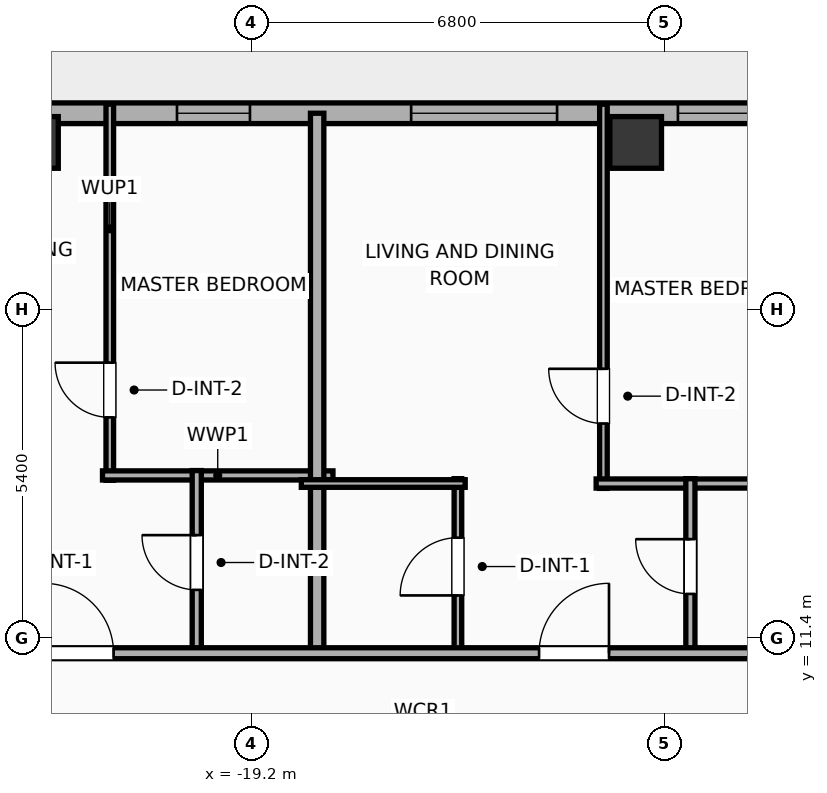
"""IFC4 building model, lengths in metres.
Left out: names, types, materials, properties, quantities, classifications, styles, units other than length and angle.
Written with IfcOpenShell. Run it as: python <this file> out.ifc"""

import sys

from ifc_helpers import new_model, si_unit, direction, frame, frame_2d, origin, origin_2d, place, context, subcontext, project, spatial, rectangle, hollow_rectangle, extrude, element, fill, save


model = new_model("IFC4")
c1 = context("Model", 3, precision=1e-05, world=origin(), true_north=direction((0.0, 1.0)))
c2 = subcontext(c1, "Body", "Model", "MODEL_VIEW")
j1 = project(units=[si_unit("LENGTHUNIT", "METRE"), si_unit("PLANEANGLEUNIT", "RADIAN")], contexts=[c1])
p1 = place(None, origin())
s1 = spatial("IfcSite", under=j1, at=p1, CompositionType="ELEMENT")
p2 = place(p1, origin())
s2 = spatial("IfcBuilding", under=s1, at=p2, CompositionType="ELEMENT")
p3 = place(p2, frame((0.0, 0.0, 231.4)))
s3 = spatial("IfcBuildingStorey", under=s2, at=p3, CompositionType="ELEMENT", Elevation=231.4)
for number, where, z_axis, x_axis in (
    (1, (-12.88, 19.55, 0.0), (0.0, 0.0, 1.0), (1.0, 0.0, 0.0)),
    (2, (-22.8, 19.55, 0.0), (0.0, 0.0, 1.0), (1.0, 0.0, 0.0)),
):
    element("IfcColumn", number, at=place(p3, frame(where, z_axis=z_axis, x_axis=x_axis)), inside=s3, PredefinedType="COLUMN", context=c2, shape_type="SweptSolid", body=[
        extrude(hollow_rectangle(XDim=0.85, YDim=0.85, WallThickness=0.028, at=origin_2d()), origin(), (0.0, 0.0, 1.0), 3.9),
    ])
p4 = place(p3, frame((-22.783, 20.03, 0.0), z_axis=(0.0, 0.0, 1.0), x_axis=(1.0, 0.0, 0.0)))
e3 = element("IfcWall", 3, at=p4, inside=s3, PredefinedType="ELEMENTEDWALL", context=c2, shape_type="SweptSolid", body=[
    extrude(rectangle(XDim=49.566, YDim=0.34, at=frame_2d((24.783, 0.0))), origin(), (0.0, 0.0, 1.0), 3.65),
])
p5 = place(p4, frame((14.12, 0.0, 0.0)))
e4 = element("IfcOpeningElement", 4, at=p5, cuts=e3, PredefinedType="OPENING", context=c2, shape_type="SweptSolid", body=[
    extrude(rectangle(XDim=1.5, YDim=2.05, at=frame_2d((0.75, 1.025))), frame((0.0, 0.18, 0.0), z_axis=(0.0, -1.0, 0.0), x_axis=(1.0, 0.0, 0.0)), (0.0, 0.0, 1.0), 0.36),
])
p6 = place(p4, frame((6.211, 0.0, 0.75)))
e5 = element("IfcOpeningElement", 5, at=p6, cuts=e3, PredefinedType="OPENING", context=c2, shape_type="SweptSolid", body=[
    extrude(rectangle(XDim=2.4, YDim=2.1, at=frame_2d((1.2, 1.05))), frame((0.0, 0.18, 0.0), z_axis=(0.0, -1.0, 0.0), x_axis=(1.0, 0.0, 0.0)), (0.0, 0.0, 1.0), 0.36),
])
p7 = place(p4, frame((23.583, 0.0, 0.75)))
e6 = element("IfcOpeningElement", 6, at=p7, cuts=e3, PredefinedType="OPENING", context=c2, shape_type="SweptSolid", body=[
    extrude(rectangle(XDim=2.4, YDim=2.1, at=frame_2d((1.2, 1.05))), frame((0.0, 0.18, 0.0), z_axis=(0.0, -1.0, 0.0), x_axis=(1.0, 0.0, 0.0)), (0.0, 0.0, 1.0), 0.36),
])
p8 = place(p4, frame((33.947, 0.0, 0.0)))
e7 = element("IfcOpeningElement", 7, at=p8, cuts=e3, PredefinedType="OPENING", context=c2, shape_type="SweptSolid", body=[
    extrude(rectangle(XDim=1.5, YDim=2.05, at=frame_2d((0.75, 1.025))), frame((0.0, 0.18, 0.0), z_axis=(0.0, -1.0, 0.0), x_axis=(1.0, 0.0, 0.0)), (0.0, 0.0, 1.0), 0.36),
])
p9 = place(p4, frame((2.36, 0.0, 0.75)))
e8 = element("IfcOpeningElement", 8, at=p9, cuts=e3, PredefinedType="OPENING", context=c2, shape_type="SweptSolid", body=[
    extrude(rectangle(XDim=1.2, YDim=2.05, at=frame_2d((0.6, 1.025))), frame((0.0, 0.18, 0.0), z_axis=(0.0, -1.0, 0.0), x_axis=(1.0, 0.0, 0.0)), (0.0, 0.0, 1.0), 0.36),
])
p10 = place(p4, frame((10.598, 0.0, 0.75)))
e9 = element("IfcOpeningElement", 9, at=p10, cuts=e3, PredefinedType="OPENING", context=c2, shape_type="SweptSolid", body=[
    extrude(rectangle(XDim=1.2, YDim=2.05, at=frame_2d((0.6, 1.025))), frame((0.0, 0.18, 0.0), z_axis=(0.0, -1.0, 0.0), x_axis=(1.0, 0.0, 0.0)), (0.0, 0.0, 1.0), 0.36),
])
p11 = place(p4, frame((17.478, 0.0, 0.75)))
e10 = element("IfcOpeningElement", 10, at=p11, cuts=e3, PredefinedType="OPENING", context=c2, shape_type="SweptSolid", body=[
    extrude(rectangle(XDim=1.2, YDim=2.05, at=frame_2d((0.6, 1.025))), frame((0.0, 0.18, 0.0), z_axis=(0.0, -1.0, 0.0), x_axis=(1.0, 0.0, 0.0)), (0.0, 0.0, 1.0), 0.36),
])
p12 = place(p4, frame((20.978, 0.0, 0.75)))
e11 = element("IfcOpeningElement", 11, at=p12, cuts=e3, PredefinedType="OPENING", context=c2, shape_type="SweptSolid", body=[
    extrude(rectangle(XDim=1.2, YDim=2.05, at=frame_2d((0.6, 1.025))), frame((0.0, 0.18, 0.0), z_axis=(0.0, -1.0, 0.0), x_axis=(1.0, 0.0, 0.0)), (0.0, 0.0, 1.0), 0.36),
])
p13 = place(p4, frame((27.758, 0.0, 0.75)))
e12 = element("IfcOpeningElement", 12, at=p13, cuts=e3, PredefinedType="OPENING", context=c2, shape_type="SweptSolid", body=[
    extrude(rectangle(XDim=1.2, YDim=2.05, at=frame_2d((0.6, 1.025))), frame((0.0, 0.18, 0.0), z_axis=(0.0, -1.0, 0.0), x_axis=(1.0, 0.0, 0.0)), (0.0, 0.0, 1.0), 0.36),
])
p14 = place(p4, frame((31.037, 0.0, 0.75)))
e13 = element("IfcOpeningElement", 13, at=p14, cuts=e3, PredefinedType="OPENING", context=c2, shape_type="SweptSolid", body=[
    extrude(rectangle(XDim=1.2, YDim=2.05, at=frame_2d((0.6, 1.025))), frame((0.0, 0.18, 0.0), z_axis=(0.0, -1.0, 0.0), x_axis=(1.0, 0.0, 0.0)), (0.0, 0.0, 1.0), 0.36),
])
p15 = place(p4, frame((37.596, 0.0, 0.75)))
e14 = element("IfcOpeningElement", 14, at=p15, cuts=e3, PredefinedType="OPENING", context=c2, shape_type="SweptSolid", body=[
    extrude(rectangle(XDim=1.2, YDim=2.05, at=frame_2d((0.6, 1.025))), frame((0.0, 0.18, 0.0), z_axis=(0.0, -1.0, 0.0), x_axis=(1.0, 0.0, 0.0)), (0.0, 0.0, 1.0), 0.36),
])
p16 = place(p4, frame((40.876, 0.0, 0.75)))
e15 = element("IfcOpeningElement", 15, at=p16, cuts=e3, PredefinedType="OPENING", context=c2, shape_type="SweptSolid", body=[
    extrude(rectangle(XDim=1.2, YDim=2.05, at=frame_2d((0.6, 1.025))), frame((0.0, 0.18, 0.0), z_axis=(0.0, -1.0, 0.0), x_axis=(1.0, 0.0, 0.0)), (0.0, 0.0, 1.0), 0.36),
])
p17 = place(p4, frame((44.156, 0.0, 0.75)))
e16 = element("IfcOpeningElement", 16, at=p17, cuts=e3, PredefinedType="OPENING", context=c2, shape_type="SweptSolid", body=[
    extrude(rectangle(XDim=1.2, YDim=2.05, at=frame_2d((0.6, 1.025))), frame((0.0, 0.18, 0.0), z_axis=(0.0, -1.0, 0.0), x_axis=(1.0, 0.0, 0.0)), (0.0, 0.0, 1.0), 0.36),
])
p18 = place(p4, frame((46.969, 0.0, 0.75)))
e17 = element("IfcOpeningElement", 17, at=p18, cuts=e3, PredefinedType="OPENING", context=c2, shape_type="SweptSolid", body=[
    extrude(rectangle(XDim=1.2, YDim=2.05, at=frame_2d((0.6, 1.025))), frame((0.0, 0.18, 0.0), z_axis=(0.0, -1.0, 0.0), x_axis=(1.0, 0.0, 0.0)), (0.0, 0.0, 1.0), 0.36),
])
p19 = place(p3, frame((-21.528, 13.994, 0.0), z_axis=(0.0, 0.0, 1.0), x_axis=(0.0, 1.0, 0.0)))
e18 = element("IfcWall", 18, at=p19, inside=s3, PredefinedType="PARTITIONING", context=c2, shape_type="SweptSolid", body=[
    extrude(rectangle(XDim=6.186, YDim=0.125, at=frame_2d((3.093, 0.0))), origin(), (0.0, 0.0, 1.0), 3.09),
])
p20 = place(p19, frame((1.035, 0.0, 0.0)))
e19 = element("IfcOpeningElement", 19, at=p20, cuts=e18, PredefinedType="OPENING", context=c2, shape_type="SweptSolid", body=[
    extrude(rectangle(XDim=0.9, YDim=2.05, at=frame_2d((0.45, 1.025))), frame((0.0, 0.073, 0.0), z_axis=(0.0, -1.0, 0.0), x_axis=(1.0, 0.0, 0.0)), (0.0, 0.0, 1.0), 0.145),
])
p21 = place(p3, frame((-21.648, 14.074, 0.0), z_axis=(0.0, 0.0, 1.0), x_axis=(1.0, 0.0, 0.0)))
e20 = element("IfcWall", 20, at=p21, inside=s3, PredefinedType="PLUMBINGWALL", context=c2, shape_type="SweptSolid", body=[
    extrude(rectangle(XDim=3.79, YDim=0.15, at=frame_2d((1.895, 0.0))), origin(), (0.0, 0.0, 1.0), 3.65),
])
p22 = place(p3, frame((-20.098, 11.13, 0.0), z_axis=(0.0, 0.0, 1.0), x_axis=(0.0, 1.0, 0.0)))
e21 = element("IfcWall", 21, at=p22, inside=s3, PredefinedType="PLUMBINGWALL", context=c2, shape_type="SweptSolid", body=[
    extrude(rectangle(XDim=3.024, YDim=0.15, at=frame_2d((1.512, 0.0))), origin(), (0.0, 0.0, 1.0), 3.65),
])
p23 = place(p22, frame((1.062, 0.0, 0.0)))
e22 = element("IfcOpeningElement", 22, at=p23, cuts=e21, PredefinedType="OPENING", context=c2, shape_type="SweptSolid", body=[
    extrude(rectangle(XDim=0.9, YDim=2.05, at=frame_2d((0.45, 1.025))), frame((0.0, 0.085, 0.0), z_axis=(0.0, -1.0, 0.0), x_axis=(1.0, 0.0, 0.0)), (0.0, 0.0, 1.0), 0.17),
])
p24 = place(p3, frame((-18.118, 11.07, 0.0), z_axis=(0.0, 0.0, 1.0), x_axis=(0.0, 1.0, 0.0)))
e23 = element("IfcWall", 23, at=p24, inside=s3, PredefinedType="PARTITIONING", context=c2, shape_type="SweptSolid", body=[
    extrude(rectangle(XDim=8.96, YDim=0.22, at=frame_2d((4.48, 0.0))), origin(), (0.0, 0.0, 1.0), 3.65),
])
p25 = place(p3, frame((-13.41, 13.861, 0.0), z_axis=(0.0, 0.0, 1.0), x_axis=(0.0, 1.0, 0.0)))
e24 = element("IfcWall", 24, at=p25, inside=s3, PredefinedType="PARTITIONING", context=c2, shape_type="SweptSolid", body=[
    extrude(rectangle(XDim=6.319, YDim=0.125, at=frame_2d((3.159, 0.0))), origin(), (0.0, 0.0, 1.0), 3.65),
])
p26 = place(p25, frame((1.067, 0.0, 0.0)))
e25 = element("IfcOpeningElement", 25, at=p26, cuts=e24, PredefinedType="OPENING", context=c2, shape_type="SweptSolid", body=[
    extrude(rectangle(XDim=0.9, YDim=2.05, at=frame_2d((0.45, 1.025))), frame((0.0, 0.073, 0.0), z_axis=(0.0, -1.0, 0.0), x_axis=(1.0, 0.0, 0.0)), (0.0, 0.0, 1.0), 0.145),
])
p27 = place(p3, frame((-13.53, 13.941, 0.0), z_axis=(0.0, 0.0, 1.0), x_axis=(1.0, 0.0, 0.0)))
e26 = element("IfcWall", 26, at=p27, inside=s3, PredefinedType="PLUMBINGWALL", context=c2, shape_type="SweptSolid", body=[
    extrude(rectangle(XDim=3.79, YDim=0.15, at=frame_2d((1.895, 0.0))), origin(), (0.0, 0.0, 1.0), 3.65),
])
p28 = place(p3, frame((-15.803, 11.13, 0.0), z_axis=(0.0, 0.0, 1.0), x_axis=(0.0, 1.0, 0.0)))
e27 = element("IfcWall", 27, at=p28, inside=s3, PredefinedType="PARTITIONING", context=c2, shape_type="SweptSolid", body=[
    extrude(rectangle(XDim=2.891, YDim=0.125, at=frame_2d((1.446, 0.0))), origin(), (0.0, 0.0, 1.0), 3.65),
])
p29 = place(p28, frame((0.97, 0.0, 0.0)))
e28 = element("IfcOpeningElement", 28, at=p29, cuts=e27, PredefinedType="OPENING", context=c2, shape_type="SweptSolid", body=[
    extrude(rectangle(XDim=0.95, YDim=2.05, at=frame_2d((0.475, 1.025))), frame((0.0, 0.073, 0.0), z_axis=(0.0, -1.0, 0.0), x_axis=(1.0, 0.0, 0.0)), (0.0, 0.0, 1.0), 0.145),
])
p30 = place(p3, frame((-18.378, 13.941, 0.0), z_axis=(0.0, 0.0, 1.0), x_axis=(1.0, 0.0, 0.0)))
e29 = element("IfcWall", 29, at=p30, inside=s3, PredefinedType="PARTITIONING", context=c2, shape_type="SweptSolid", body=[
    extrude(rectangle(XDim=2.695, YDim=0.125, at=frame_2d((1.347, 0.0))), origin(), (0.0, 0.0, 1.0), 3.65),
])
p31 = place(p3, frame((-11.98, 11.13, 0.0), z_axis=(0.0, 0.0, 1.0), x_axis=(0.0, 1.0, 0.0)))
e30 = element("IfcWall", 30, at=p31, inside=s3, PredefinedType="PLUMBINGWALL", context=c2, shape_type="SweptSolid", body=[
    extrude(rectangle(XDim=2.891, YDim=0.15, at=frame_2d((1.446, 0.0))), origin(), (0.0, 0.0, 1.0), 3.65),
])
p32 = place(p31, frame((0.996, 0.0, 0.0)))
e31 = element("IfcOpeningElement", 31, at=p32, cuts=e30, PredefinedType="OPENING", context=c2, shape_type="SweptSolid", body=[
    extrude(rectangle(XDim=0.9, YDim=2.05, at=frame_2d((0.45, 1.025))), frame((0.0, 0.085, 0.0), z_axis=(0.0, -1.0, 0.0), x_axis=(1.0, 0.0, 0.0)), (0.0, 0.0, 1.0), 0.17),
])
p33 = place(p3, frame((-26.23, 11.15, 0.0), z_axis=(0.0, 0.0, 1.0), x_axis=(1.0, 0.0, 0.0)))
e32 = element("IfcWall", 32, at=p33, inside=s3, PredefinedType="PARTITIONING", context=c2, shape_type="SweptSolid", body=[
    extrude(rectangle(XDim=56.46, YDim=0.18, at=frame_2d((28.23, 0.0))), origin(), (0.0, 0.0, 1.0), 3.65),
])
p34 = place(p33, frame((3.614, 0.0, 0.0)))
e33 = element("IfcOpeningElement", 33, at=p34, cuts=e32, PredefinedType="OPENING", context=c2, shape_type="SweptSolid", body=[
    extrude(rectangle(XDim=1.15, YDim=2.05, at=frame_2d((0.575, 1.025))), frame((0.0, 0.1, 0.0), z_axis=(0.0, -1.0, 0.0), x_axis=(1.0, 0.0, 0.0)), (0.0, 0.0, 1.0), 0.2),
])
p35 = place(p33, frame((11.761, 0.0, 0.0)))
e34 = element("IfcOpeningElement", 34, at=p35, cuts=e32, PredefinedType="OPENING", context=c2, shape_type="SweptSolid", body=[
    extrude(rectangle(XDim=1.15, YDim=2.05, at=frame_2d((0.575, 1.025))), frame((0.0, 0.1, 0.0), z_axis=(0.0, -1.0, 0.0), x_axis=(1.0, 0.0, 0.0)), (0.0, 0.0, 1.0), 0.2),
])
p36 = place(p33, frame((19.447, 0.0, 0.0)))
e35 = element("IfcOpeningElement", 35, at=p36, cuts=e32, PredefinedType="OPENING", context=c2, shape_type="SweptSolid", body=[
    extrude(rectangle(XDim=0.9, YDim=2.05, at=frame_2d((0.45, 1.025))), frame((0.0, 0.1, 0.0), z_axis=(0.0, -1.0, 0.0), x_axis=(1.0, 0.0, 0.0)), (0.0, 0.0, 1.0), 0.2),
])
p37 = place(p33, frame((26.448, 0.0, 0.0)))
e36 = element("IfcOpeningElement", 36, at=p37, cuts=e32, PredefinedType="OPENING", context=c2, shape_type="SweptSolid", body=[
    extrude(rectangle(XDim=0.9, YDim=2.05, at=frame_2d((0.45, 1.025))), frame((0.0, 0.1, 0.0), z_axis=(0.0, -1.0, 0.0), x_axis=(1.0, 0.0, 0.0)), (0.0, 0.0, 1.0), 0.2),
])
p38 = place(p33, frame((33.223, 0.0, 0.0)))
e37 = element("IfcOpeningElement", 37, at=p38, cuts=e32, PredefinedType="OPENING", context=c2, shape_type="SweptSolid", body=[
    extrude(rectangle(XDim=0.9, YDim=2.05, at=frame_2d((0.45, 1.025))), frame((0.0, 0.1, 0.0), z_axis=(0.0, -1.0, 0.0), x_axis=(1.0, 0.0, 0.0)), (0.0, 0.0, 1.0), 0.2),
])
p39 = place(p33, frame((39.783, 0.0, 0.0)))
e38 = element("IfcOpeningElement", 38, at=p39, cuts=e32, PredefinedType="OPENING", context=c2, shape_type="SweptSolid", body=[
    extrude(rectangle(XDim=0.9, YDim=2.05, at=frame_2d((0.45, 1.025))), frame((0.0, 0.1, 0.0), z_axis=(0.0, -1.0, 0.0), x_axis=(1.0, 0.0, 0.0)), (0.0, 0.0, 1.0), 0.2),
])
p40 = place(p33, frame((46.344, 0.0, 0.0)))
e39 = element("IfcOpeningElement", 39, at=p40, cuts=e32, PredefinedType="OPENING", context=c2, shape_type="SweptSolid", body=[
    extrude(rectangle(XDim=0.9, YDim=2.05, at=frame_2d((0.45, 1.025))), frame((0.0, 0.1, 0.0), z_axis=(0.0, -1.0, 0.0), x_axis=(1.0, 0.0, 0.0)), (0.0, 0.0, 1.0), 0.2),
])
p41 = place(p33, frame((52.933, 0.0, 0.0)))
e40 = element("IfcOpeningElement", 40, at=p41, cuts=e32, PredefinedType="OPENING", context=c2, shape_type="SweptSolid", body=[
    extrude(rectangle(XDim=0.9, YDim=2.05, at=frame_2d((0.45, 1.025))), frame((0.0, 0.1, 0.0), z_axis=(0.0, -1.0, 0.0), x_axis=(1.0, 0.0, 0.0)), (0.0, 0.0, 1.0), 0.2),
])
p42 = place(p6, origin())
e41 = element("IfcWindow", 41, at=p42, inside=s3, PartitioningType="SINGLE_PANEL", PredefinedType="WINDOW", context=c2, shape_type="SweptSolid", body=[
    extrude(rectangle(XDim=2.4, YDim=2.1, at=frame_2d((1.2, 1.05))), frame((0.0, 0.03, 0.0), z_axis=(0.0, -1.0, 0.0), x_axis=(1.0, 0.0, 0.0)), (0.0, 0.0, 1.0), 0.06),
])
fill(e5, e41)
p43 = place(p9, origin())
e42 = element("IfcWindow", 42, at=p43, inside=s3, PartitioningType="SINGLE_PANEL", PredefinedType="WINDOW", context=c2, shape_type="SweptSolid", body=[
    extrude(rectangle(XDim=1.2, YDim=2.05, at=frame_2d((0.6, 1.025))), frame((0.0, 0.03, 0.0), z_axis=(0.0, -1.0, 0.0), x_axis=(1.0, 0.0, 0.0)), (0.0, 0.0, 1.0), 0.06),
])
fill(e8, e42)
p44 = place(p10, origin())
e43 = element("IfcWindow", 43, at=p44, inside=s3, PartitioningType="SINGLE_PANEL", PredefinedType="WINDOW", context=c2, shape_type="SweptSolid", body=[
    extrude(rectangle(XDim=1.2, YDim=2.05, at=frame_2d((0.6, 1.025))), frame((0.0, 0.03, 0.0), z_axis=(0.0, -1.0, 0.0), x_axis=(1.0, 0.0, 0.0)), (0.0, 0.0, 1.0), 0.06),
])
fill(e9, e43)
p45 = place(p20, origin())
e44 = element("IfcDoor", 44, at=p45, inside=s3, OperationType="SINGLE_SWING_RIGHT", PredefinedType="DOOR", context=c2, shape_type="SweptSolid", body=[
    extrude(rectangle(XDim=0.9, YDim=2.05, at=frame_2d((0.45, 1.025))), frame((0.0, 0.025, 0.0), z_axis=(0.0, -1.0, 0.0), x_axis=(1.0, 0.0, 0.0)), (0.0, 0.0, 1.0), 0.05),
])
fill(e19, e44)
p46 = place(p23, origin())
e45 = element("IfcDoor", 45, at=p46, inside=s3, OperationType="SINGLE_SWING_RIGHT", PredefinedType="DOOR", context=c2, shape_type="SweptSolid", body=[
    extrude(rectangle(XDim=0.9, YDim=2.05, at=frame_2d((0.45, 1.025))), frame((0.0, 0.025, 0.0), z_axis=(0.0, -1.0, 0.0), x_axis=(1.0, 0.0, 0.0)), (0.0, 0.0, 1.0), 0.05),
])
fill(e22, e45)
p47 = place(p26, origin())
e46 = element("IfcDoor", 46, at=p47, inside=s3, OperationType="SINGLE_SWING_RIGHT", PredefinedType="DOOR", context=c2, shape_type="SweptSolid", body=[
    extrude(rectangle(XDim=0.9, YDim=2.05, at=frame_2d((0.45, 1.025))), frame((0.0, 0.025, 0.0), z_axis=(0.0, -1.0, 0.0), x_axis=(1.0, 0.0, 0.0)), (0.0, 0.0, 1.0), 0.05),
])
fill(e25, e46)
p48 = place(p29, origin())
e47 = element("IfcDoor", 47, at=p48, inside=s3, OperationType="SINGLE_SWING_LEFT", PredefinedType="DOOR", context=c2, shape_type="SweptSolid", body=[
    extrude(rectangle(XDim=0.95, YDim=2.05, at=frame_2d((0.475, 1.025))), frame((0.0, 0.025, 0.0), z_axis=(0.0, -1.0, 0.0), x_axis=(1.0, 0.0, 0.0)), (0.0, 0.0, 1.0), 0.05),
])
fill(e28, e47)
p49 = place(p32, origin())
e48 = element("IfcDoor", 48, at=p49, inside=s3, OperationType="SINGLE_SWING_RIGHT", PredefinedType="DOOR", context=c2, shape_type="SweptSolid", body=[
    extrude(rectangle(XDim=0.9, YDim=2.05, at=frame_2d((0.45, 1.025))), frame((0.0, 0.025, 0.0), z_axis=(0.0, -1.0, 0.0), x_axis=(1.0, 0.0, 0.0)), (0.0, 0.0, 1.0), 0.05),
])
fill(e31, e48)
p50 = place(p34, origin())
e49 = element("IfcDoor", 49, at=p50, inside=s3, OperationType="SINGLE_SWING_LEFT", PredefinedType="DOOR", context=c2, shape_type="SweptSolid", body=[
    extrude(rectangle(XDim=1.15, YDim=2.05, at=frame_2d((0.575, 1.025))), frame((0.0, 0.025, 0.0), z_axis=(0.0, -1.0, 0.0), x_axis=(1.0, 0.0, 0.0)), (0.0, 0.0, 1.0), 0.05),
])
fill(e33, e49)
p51 = place(p35, origin())
e50 = element("IfcDoor", 50, at=p51, inside=s3, OperationType="SINGLE_SWING_RIGHT", PredefinedType="DOOR", context=c2, shape_type="SweptSolid", body=[
    extrude(rectangle(XDim=1.15, YDim=2.05, at=frame_2d((0.575, 1.025))), frame((0.0, 0.025, 0.0), z_axis=(0.0, -1.0, 0.0), x_axis=(1.0, 0.0, 0.0)), (0.0, 0.0, 1.0), 0.05),
])
fill(e34, e50)
save(model, sys.argv[1])
